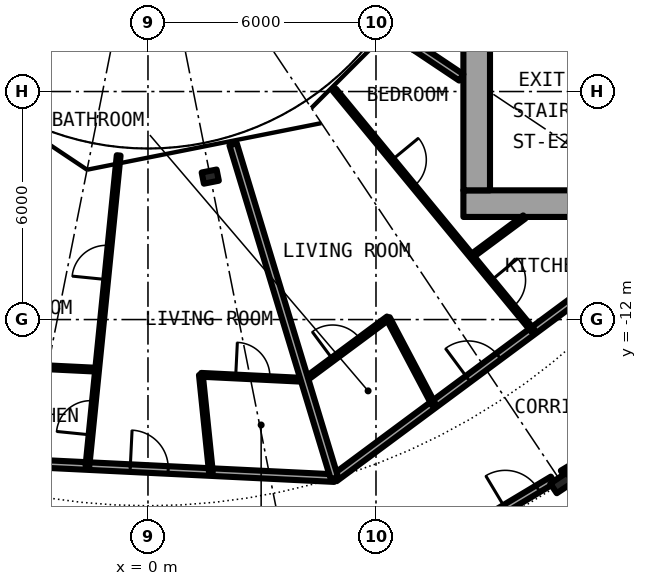
"""IFC4 building model, lengths in metres.
Left out: names, types, materials, properties, quantities, classifications, styles, units other than length and angle.
Written with IfcOpenShell. Run it as: python <this file> out.ifc"""

import sys

from ifc_helpers import new_model, si_unit, direction, frame, frame_2d, origin, origin_2d, place, context, subcontext, project, spatial, rectangle, i_section, extrude, element, fill, save


model = new_model("IFC4")
c1 = context("Model", 3, precision=1e-05, world=origin(), true_north=direction((0.0, 1.0)))
c2 = subcontext(c1, "Body", "Model", "MODEL_VIEW")
j1 = project(units=[si_unit("LENGTHUNIT", "METRE"), si_unit("PLANEANGLEUNIT", "RADIAN")], contexts=[c1])
p1 = place(None, origin())
s1 = spatial("IfcSite", under=j1, at=p1, CompositionType="ELEMENT")
p2 = place(p1, origin())
s2 = spatial("IfcBuilding", under=s1, at=p2, CompositionType="ELEMENT")
p3 = place(p2, frame((0.0, 0.0, 75.8)))
s3 = spatial("IfcBuildingStorey", under=s2, at=p3, CompositionType="ELEMENT", Elevation=75.8)
p4 = place(p3, frame((10.889, -16.297, 0.0), z_axis=(0.0, 0.0, 1.0), x_axis=(0.55557023302, -0.831469612303, 0.0)))
e1 = element("IfcColumn", 1, at=p4, inside=s3, PredefinedType="COLUMN", context=c2, shape_type="SweptSolid", body=[
    extrude(i_section(OverallWidth=0.306, OverallDepth=0.524, WebThickness=0.021, FlangeThickness=0.04, FilletRadius=0.027, at=origin_2d()), origin(), (0.0, 0.0, 1.0), 3.05),
])
p5 = place(p3, frame((1.639, -8.239, 0.0), z_axis=(0.0, 0.0, 1.0), x_axis=(0.195090322016, -0.980785280403, 0.0)))
e2 = element("IfcColumn", 2, at=p5, inside=s3, PredefinedType="COLUMN", context=c2, shape_type="SweptSolid", body=[
    extrude(i_section(OverallWidth=0.3, OverallDepth=0.4, WebThickness=0.013, FlangeThickness=0.024, FilletRadius=0.027, at=origin_2d()), origin(), (0.0, 0.0, 1.0), 3.05),
])
p6 = place(p3, frame((8.3, -8.95, 0.0), z_axis=(0.0, 0.0, 1.0), x_axis=(1.0, 0.0, 0.0)))
e3 = element("IfcWall", 3, at=p6, inside=s3, PredefinedType="SHEAR", context=c2, shape_type="SweptSolid", body=[
    extrude(rectangle(XDim=14.0, YDim=0.7, at=frame_2d((7.0, 0.0))), origin(), (0.0, 0.0, 1.0), 3.05),
])
p7 = place(p6, frame((11.575, 0.0, 0.0)))
e4 = element("IfcOpeningElement", 4, at=p7, cuts=e3, PredefinedType="OPENING", context=c2, shape_type="SweptSolid", body=[
    extrude(rectangle(XDim=1.2, YDim=2.3, at=frame_2d((0.6, 1.15))), frame((0.0, 0.36, 0.0), z_axis=(0.0, -1.0, 0.0), x_axis=(1.0, 0.0, 0.0)), (0.0, 0.0, 1.0), 0.72),
])
p8 = place(p3, frame((8.65, -8.6, 0.0), z_axis=(0.0, 0.0, 1.0), x_axis=(0.0, 1.0, 0.0)))
e5 = element("IfcWall", 5, at=p8, inside=s3, PredefinedType="SHEAR", context=c2, shape_type="SweptSolid", body=[
    extrude(rectangle(XDim=17.2, YDim=0.7, at=frame_2d((8.6, 0.0))), origin(), (0.0, 0.0, 1.0), 3.05),
])
p9 = place(p8, frame((7.4, 0.0, 0.1)))
e6 = element("IfcOpeningElement", 6, at=p9, cuts=e5, PredefinedType="OPENING", context=c2, shape_type="SweptSolid", body=[
    extrude(rectangle(XDim=2.4, YDim=2.2, at=frame_2d((1.2, 1.1))), frame((0.0, 0.36, 0.0), z_axis=(0.0, -1.0, 0.0), x_axis=(1.0, 0.0, 0.0)), (0.0, 0.0, 1.0), 0.72),
])
p10 = place(p3, frame((7.495, -18.111, 0.0), z_axis=(0.0, 0.0, 1.0), x_axis=(0.857697633371, 0.514154422046, 0.0)))
e7 = element("IfcWall", 7, at=p10, inside=s3, PredefinedType="PARTITIONING", context=c2, shape_type="SweptSolid", body=[
    extrude(rectangle(XDim=3.682, YDim=0.2, at=frame_2d((1.841, 0.0))), origin(), (0.0, 0.0, 1.0), 2.38),
])
p11 = place(p10, frame((2.224, 0.0, 0.0)))
e8 = element("IfcOpeningElement", 8, at=p11, cuts=e7, PredefinedType="OPENING", context=c2, shape_type="SweptSolid", body=[
    extrude(rectangle(XDim=1.0, YDim=2.3, at=frame_2d((0.5, 1.15))), frame((0.0, 0.11, 0.0), z_axis=(0.0, -1.0, 0.0), x_axis=(1.0, 0.0, 0.0)), (0.0, 0.0, 1.0), 0.22),
])
p12 = place(p3, frame((10.916, -16.061, 0.0), z_axis=(0.0, 0.0, 1.0), x_axis=(0.857663265693, 0.514211748875, 0.0)))
e9 = element("IfcWall", 9, at=p12, inside=s3, PredefinedType="PARTITIONING", context=c2, shape_type="SweptSolid", body=[
    extrude(rectangle(XDim=1.77, YDim=0.2, at=frame_2d((0.885, 0.0))), origin(), (0.0, 0.0, 1.0), 2.38),
])
p13 = place(p3, frame((-12.436, -15.15, 0.0), z_axis=(0.0, 0.0, 1.0), x_axis=(0.923858130651, -0.38273509694, 0.0)))
e10 = element("IfcWall", 10, at=p13, inside=s3, PredefinedType="PARTITIONING", context=c2, shape_type="SweptSolid", body=[
    extrude(rectangle(XDim=11.382, YDim=0.2, at=frame_2d((5.691, 0.0))), origin(), (0.0, 0.0, 1.0), 2.7),
])
p14 = place(p13, frame((4.239, 0.0, 0.0)))
e11 = element("IfcOpeningElement", 11, at=p14, cuts=e10, PredefinedType="OPENING", context=c2, shape_type="SweptSolid", body=[
    extrude(rectangle(XDim=1.0, YDim=2.3, at=frame_2d((0.5, 1.15))), frame((0.0, 0.11, 0.0), z_axis=(0.0, -1.0, 0.0), x_axis=(1.0, 0.0, 0.0)), (0.0, 0.0, 1.0), 0.22),
])
p15 = place(p3, frame((-6.464, -15.616, 0.0), z_axis=(0.0, 0.0, 1.0), x_axis=(0.998805876564, -0.048855101495, 0.0)))
e12 = element("IfcWall", 12, at=p15, inside=s3, PredefinedType="PARTITIONING", context=c2, shape_type="SweptSolid", body=[
    extrude(rectangle(XDim=11.384, YDim=0.2, at=frame_2d((5.692, 0.0))), origin(), (0.0, 0.0, 1.0), 2.7),
])
p16 = place(p15, frame((6.004, 0.0, 0.0)))
e13 = element("IfcOpeningElement", 13, at=p16, cuts=e12, PredefinedType="OPENING", context=c2, shape_type="SweptSolid", body=[
    extrude(rectangle(XDim=1.0, YDim=2.3, at=frame_2d((0.5, 1.15))), frame((0.0, 0.11, 0.0), z_axis=(0.0, -1.0, 0.0), x_axis=(1.0, 0.0, 0.0)), (0.0, 0.0, 1.0), 0.22),
])
p17 = place(p3, frame((4.906, -16.172, 0.0), z_axis=(0.0, 0.0, 1.0), x_axis=(0.803191461888, 0.595720971219, 0.0)))
e14 = element("IfcWall", 14, at=p17, inside=s3, PredefinedType="PARTITIONING", context=c2, shape_type="SweptSolid", body=[
    extrude(rectangle(XDim=9.76, YDim=0.2, at=frame_2d((4.88, 0.0))), origin(), (0.0, 0.0, 1.0), 2.7),
])
p18 = place(p17, frame((4.38, 0.0, 0.0)))
e15 = element("IfcOpeningElement", 15, at=p18, cuts=e14, PredefinedType="OPENING", context=c2, shape_type="SweptSolid", body=[
    extrude(rectangle(XDim=1.0, YDim=2.3, at=frame_2d((0.5, 1.15))), frame((0.0, 0.11, 0.0), z_axis=(0.0, -1.0, 0.0), x_axis=(1.0, 0.0, 0.0)), (0.0, 0.0, 1.0), 0.22),
])
p19 = place(p3, frame((-5.434, -13.119, 0.0), z_axis=(0.0, 0.0, 1.0), x_axis=(0.998795469779, -0.049067398026, 0.0)))
e16 = element("IfcWall", 16, at=p19, inside=s3, PredefinedType="PARTITIONING", context=c2, shape_type="SweptSolid", body=[
    extrude(rectangle(XDim=4.1, YDim=0.1, at=frame_2d((2.05, 0.0))), origin(), (0.0, 0.0, 1.0), 2.7),
])
p20 = place(p3, frame((1.397, -13.454, 0.0), z_axis=(0.0, 0.0, 1.0), x_axis=(0.99880129942, -0.048948588095, 0.0)))
e17 = element("IfcWall", 17, at=p20, inside=s3, PredefinedType="PARTITIONING", context=c2, shape_type="SweptSolid", body=[
    extrude(rectangle(XDim=2.733, YDim=0.1, at=frame_2d((1.367, 0.0))), origin(), (0.0, 0.0, 1.0), 2.7),
])
p21 = place(p20, frame((0.912, 0.0, 0.0)))
e18 = element("IfcOpeningElement", 18, at=p21, cuts=e17, PredefinedType="OPENING", context=c2, shape_type="SweptSolid", body=[
    extrude(rectangle(XDim=0.9, YDim=2.3, at=frame_2d((0.45, 1.15))), frame((0.0, 0.06, 0.0), z_axis=(0.0, -1.0, 0.0), x_axis=(1.0, 0.0, 0.0)), (0.0, 0.0, 1.0), 0.12),
])
p22 = place(p3, frame((4.123, -13.589, 0.0), z_axis=(0.0, 0.0, 1.0), x_axis=(0.803128348509, 0.595806055542, 0.0)))
e19 = element("IfcWall", 19, at=p22, inside=s3, PredefinedType="PARTITIONING", context=c2, shape_type="SweptSolid", body=[
    extrude(rectangle(XDim=2.734, YDim=0.1, at=frame_2d((1.367, 0.0))), origin(), (0.0, 0.0, 1.0), 2.7),
])
p23 = place(p22, frame((0.916, 0.0, 0.0)))
e20 = element("IfcOpeningElement", 20, at=p23, cuts=e19, PredefinedType="OPENING", context=c2, shape_type="SweptSolid", body=[
    extrude(rectangle(XDim=0.9, YDim=2.3, at=frame_2d((0.45, 1.15))), frame((0.0, 0.06, 0.0), z_axis=(0.0, -1.0, 0.0), x_axis=(1.0, 0.0, 0.0)), (0.0, 0.0, 1.0), 0.12),
])
p24 = place(p3, frame((8.513, -10.332, 0.0), z_axis=(0.0, 0.0, 1.0), x_axis=(0.803135014325, 0.595797070121, 0.0)))
e21 = element("IfcWall", 21, at=p24, inside=s3, PredefinedType="PARTITIONING", context=c2, shape_type="SweptSolid", body=[
    extrude(rectangle(XDim=1.732, YDim=0.1, at=frame_2d((0.866, 0.0))), origin(), (0.0, 0.0, 1.0), 2.7),
])
p25 = place(p3, frame((6.513, -4.472, 0.0), z_axis=(0.0, 0.0, 1.0), x_axis=(0.831382204863, -0.555701025225, 0.0)))
e22 = element("IfcWall", 22, at=p25, inside=s3, PredefinedType="PARTITIONING", context=c2, shape_type="SweptSolid", body=[
    extrude(rectangle(XDim=2.082, YDim=0.2, at=frame_2d((1.041, 0.0))), origin(), (0.0, 0.0, 1.0), 2.7),
])
p26 = place(p3, frame((-1.593, -15.853, 0.0), z_axis=(0.0, 0.0, 1.0), x_axis=(0.100083483356, 0.994979043176, 0.0)))
e23 = element("IfcWall", 23, at=p26, inside=s3, PredefinedType="PARTITIONING", context=c2, shape_type="SweptSolid", body=[
    extrude(rectangle(XDim=8.213, YDim=0.1, at=frame_2d((4.107, 0.0))), origin(), (0.0, 0.0, 1.0), 2.7),
])
p27 = place(p26, frame((0.823, 0.0, 0.0)))
e24 = element("IfcOpeningElement", 24, at=p27, cuts=e23, PredefinedType="OPENING", context=c2, shape_type="SweptSolid", body=[
    extrude(rectangle(XDim=0.9, YDim=2.3, at=frame_2d((0.45, 1.15))), frame((0.0, 0.06, 0.0), z_axis=(0.0, -1.0, 0.0), x_axis=(1.0, 0.0, 0.0)), (0.0, 0.0, 1.0), 0.12),
])
p28 = place(p26, frame((4.931, 0.0, 0.0)))
e25 = element("IfcOpeningElement", 25, at=p28, cuts=e23, PredefinedType="OPENING", context=c2, shape_type="SweptSolid", body=[
    extrude(rectangle(XDim=0.9, YDim=2.3, at=frame_2d((0.45, 1.15))), frame((0.0, 0.06, 0.0), z_axis=(0.0, -1.0, 0.0), x_axis=(1.0, 0.0, 0.0)), (0.0, 0.0, 1.0), 0.12),
])
p29 = place(p3, frame((1.392, -13.454, 0.0), z_axis=(0.0, 0.0, 1.0), x_axis=(0.102594773028, -0.994723234145, 0.0)))
e26 = element("IfcWall", 26, at=p29, inside=s3, PredefinedType="PARTITIONING", context=c2, shape_type="SweptSolid", body=[
    extrude(rectangle(XDim=2.573, YDim=0.1, at=frame_2d((1.286, 0.0))), origin(), (0.0, 0.0, 1.0), 2.7),
])
p30 = place(p3, frame((2.24, -7.388, 0.0), z_axis=(0.0, 0.0, 1.0), x_axis=(0.290420725025, -0.956899055531, 0.0)))
e27 = element("IfcWall", 27, at=p30, inside=s3, PredefinedType="PARTITIONING", context=c2, shape_type="SweptSolid", body=[
    extrude(rectangle(XDim=9.18, YDim=0.2, at=frame_2d((4.59, 0.0))), origin(), (0.0, 0.0, 1.0), 2.7),
])
p31 = place(p3, frame((4.908, -5.959, 0.0), z_axis=(0.0, 0.0, 1.0), x_axis=(0.636105207978, -0.771602335652, 0.0)))
e28 = element("IfcWall", 28, at=p31, inside=s3, PredefinedType="PARTITIONING", context=c2, shape_type="SweptSolid", body=[
    extrude(rectangle(XDim=8.213, YDim=0.1, at=frame_2d((4.106, 0.0))), origin(), (0.0, 0.0, 1.0), 2.7),
])
p32 = place(p31, frame((6.49, 0.0, 0.0)))
e29 = element("IfcOpeningElement", 29, at=p32, cuts=e28, PredefinedType="OPENING", context=c2, shape_type="SweptSolid", body=[
    extrude(rectangle(XDim=0.9, YDim=2.3, at=frame_2d((0.45, 1.15))), frame((0.0, 0.06, 0.0), z_axis=(0.0, -1.0, 0.0), x_axis=(1.0, 0.0, 0.0)), (0.0, 0.0, 1.0), 0.12),
])
p33 = place(p31, frame((2.384, 0.0, 0.0)))
e30 = element("IfcOpeningElement", 30, at=p33, cuts=e28, PredefinedType="OPENING", context=c2, shape_type="SweptSolid", body=[
    extrude(rectangle(XDim=0.9, YDim=2.3, at=frame_2d((0.45, 1.15))), frame((0.0, 0.06, 0.0), z_axis=(0.0, -1.0, 0.0), x_axis=(1.0, 0.0, 0.0)), (0.0, 0.0, 1.0), 0.12),
])
p34 = place(p3, frame((6.316, -11.961, 0.0), z_axis=(0.0, 0.0, 1.0), x_axis=(0.467037016128, -0.884237765291, 0.0)))
e31 = element("IfcWall", 31, at=p34, inside=s3, PredefinedType="PARTITIONING", context=c2, shape_type="SweptSolid", body=[
    extrude(rectangle(XDim=2.572, YDim=0.1, at=frame_2d((1.286, 0.0))), origin(), (0.0, 0.0, 1.0), 2.7),
])
p35 = place(p11, origin())
e32 = element("IfcDoor", 32, at=p35, inside=s3, OperationType="SINGLE_SWING_RIGHT", PredefinedType="DOOR", context=c2, shape_type="SweptSolid", body=[
    extrude(rectangle(XDim=1.0, YDim=2.3, at=frame_2d((0.5, 1.15))), frame((0.0, 0.025, 0.0), z_axis=(0.0, -1.0, 0.0), x_axis=(1.0, 0.0, 0.0)), (0.0, 0.0, 1.0), 0.05),
])
fill(e8, e32)
p36 = place(p16, origin())
e33 = element("IfcDoor", 33, at=p36, inside=s3, OperationType="SINGLE_SWING_RIGHT", PredefinedType="DOOR", context=c2, shape_type="SweptSolid", body=[
    extrude(rectangle(XDim=1.0, YDim=2.3, at=frame_2d((0.5, 1.15))), frame((0.0, 0.025, 0.0), z_axis=(0.0, -1.0, 0.0), x_axis=(1.0, 0.0, 0.0)), (0.0, 0.0, 1.0), 0.05),
])
fill(e13, e33)
p37 = place(p21, origin())
e34 = element("IfcDoor", 34, at=p37, inside=s3, OperationType="SINGLE_SWING_LEFT", PredefinedType="DOOR", context=c2, shape_type="SweptSolid", body=[
    extrude(rectangle(XDim=0.9, YDim=2.3, at=frame_2d((0.45, 1.15))), frame((0.0, 0.025, 0.0), z_axis=(0.0, -1.0, 0.0), x_axis=(1.0, 0.0, 0.0)), (0.0, 0.0, 1.0), 0.05),
])
fill(e18, e34)
p38 = place(p27, origin())
e35 = element("IfcDoor", 35, at=p38, inside=s3, OperationType="SINGLE_SWING_LEFT", PredefinedType="DOOR", context=c2, shape_type="SweptSolid", body=[
    extrude(rectangle(XDim=0.9, YDim=2.3, at=frame_2d((0.45, 1.15))), frame((0.0, 0.025, 0.0), z_axis=(0.0, -1.0, 0.0), x_axis=(1.0, 0.0, 0.0)), (0.0, 0.0, 1.0), 0.05),
])
fill(e24, e35)
p39 = place(p28, origin())
e36 = element("IfcDoor", 36, at=p39, inside=s3, OperationType="SINGLE_SWING_RIGHT", PredefinedType="DOOR", context=c2, shape_type="SweptSolid", body=[
    extrude(rectangle(XDim=0.9, YDim=2.3, at=frame_2d((0.45, 1.15))), frame((0.0, 0.025, 0.0), z_axis=(0.0, -1.0, 0.0), x_axis=(1.0, 0.0, 0.0)), (0.0, 0.0, 1.0), 0.05),
])
fill(e25, e36)
p40 = place(p18, origin())
e37 = element("IfcDoor", 37, at=p40, inside=s3, OperationType="SINGLE_SWING_LEFT", PredefinedType="DOOR", context=c2, shape_type="SweptSolid", body=[
    extrude(rectangle(XDim=1.0, YDim=2.3, at=frame_2d((0.5, 1.15))), frame((0.0, 0.025, 0.0), z_axis=(0.0, -1.0, 0.0), x_axis=(1.0, 0.0, 0.0)), (0.0, 0.0, 1.0), 0.05),
])
fill(e15, e37)
p41 = place(p23, origin())
e38 = element("IfcDoor", 38, at=p41, inside=s3, OperationType="SINGLE_SWING_LEFT", PredefinedType="DOOR", context=c2, shape_type="SweptSolid", body=[
    extrude(rectangle(XDim=0.9, YDim=2.3, at=frame_2d((0.45, 1.15))), frame((0.0, 0.025, 0.0), z_axis=(0.0, -1.0, 0.0), x_axis=(1.0, 0.0, 0.0)), (0.0, 0.0, 1.0), 0.05),
])
fill(e20, e38)
p42 = place(p32, origin())
e39 = element("IfcDoor", 39, at=p42, inside=s3, OperationType="SINGLE_SWING_RIGHT", PredefinedType="DOOR", context=c2, shape_type="SweptSolid", body=[
    extrude(rectangle(XDim=0.9, YDim=2.3, at=frame_2d((0.45, 1.15))), frame((0.0, 0.025, 0.0), z_axis=(0.0, -1.0, 0.0), x_axis=(1.0, 0.0, 0.0)), (0.0, 0.0, 1.0), 0.05),
])
fill(e29, e39)
p43 = place(p33, origin())
e40 = element("IfcDoor", 40, at=p43, inside=s3, OperationType="SINGLE_SWING_LEFT", PredefinedType="DOOR", context=c2, shape_type="SweptSolid", body=[
    extrude(rectangle(XDim=0.9, YDim=2.3, at=frame_2d((0.45, 1.15))), frame((0.0, 0.025, 0.0), z_axis=(0.0, -1.0, 0.0), x_axis=(1.0, 0.0, 0.0)), (0.0, 0.0, 1.0), 0.05),
])
fill(e30, e40)
save(model, sys.argv[1])
